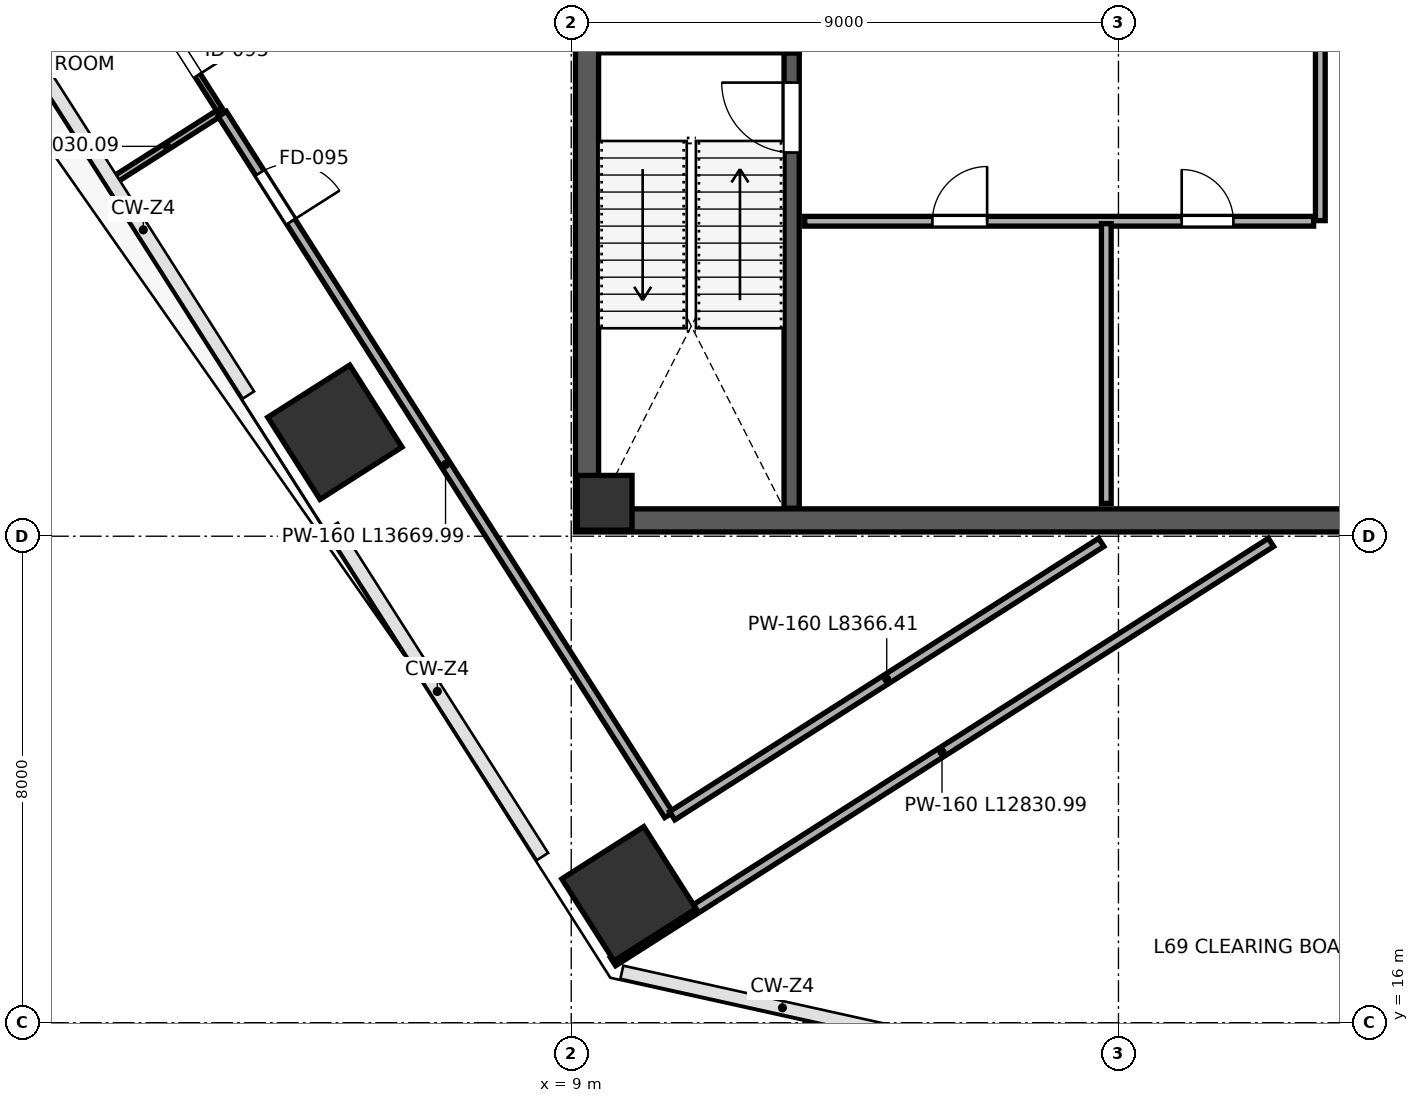
"""IFC4 building model, lengths in metres.
Left out: names, types, materials, properties, quantities, classifications, styles, units other than length and angle.
Written with IfcOpenShell. Run it as: python <this file> out.ifc"""

import sys

from ifc_helpers import new_model, si_unit, direction, frame, frame_2d, origin, origin_2d, place, context, subcontext, project, spatial, rectangle, extrude, source, transform, mapped, element, fill, save


model = new_model("IFC4")
c1 = context("Model", 3, precision=1e-05, world=origin(), true_north=direction((0.0, 1.0)))
c2 = subcontext(c1, "Body", "Model", "MODEL_VIEW")
j1 = project(units=[si_unit("LENGTHUNIT", "METRE"), si_unit("PLANEANGLEUNIT", "RADIAN")], contexts=[c1])
p1 = place(None, origin())
s1 = spatial("IfcSite", under=j1, at=p1, CompositionType="ELEMENT")
p2 = place(p1, origin())
s2 = spatial("IfcBuilding", under=s1, at=p2, CompositionType="ELEMENT")
p3 = place(p2, frame((0.0, 0.0, 307.2)))
s3 = spatial("IfcBuildingStorey", under=s2, at=p3, CompositionType="ELEMENT", Elevation=307.2)
m1 = source(origin(), c2, "Body", "SweptSolid", [
    extrude(rectangle(XDim=0.9, YDim=0.9, at=origin_2d()), origin(), (0.0, 0.0, 1.0), 4.198),
])
p4 = place(p3, frame((9.55, 24.55, 0.001), z_axis=(0.0, 0.0, 1.0), x_axis=(1.0, 0.0, 0.0)))
e1 = element("IfcColumn", 1, at=p4, inside=s3, PredefinedType="COLUMN", context=c2, shape_type="MappedRepresentation", body=[
    mapped(m1, transform((0.0, 0.0, 0.0), scale=1.0)),
])
m2 = source(origin(), c2, "Body", "SweptSolid", [
    extrude(rectangle(XDim=1.6, YDim=1.6, at=origin_2d()), origin(), (0.0, 0.0, 1.0), 4.198),
])
for number, where, z_axis, x_axis in (
    (2, (5.113, 25.71, 0.001), (0.0, 0.0, 1.0), (-0.537, 0.843, 0.0)),
    (3, (9.949, 18.12, 0.001), (0.0, 0.0, 1.0), (-0.537, 0.843, 0.0)),
    (4, (22.544, 15.472, 0.001), (0.0, 0.0, 1.0), (-0.537, 0.843, 0.0)),
):
    element("IfcColumn", number, at=place(p3, frame(where, z_axis=z_axis, x_axis=x_axis)), inside=s3, PredefinedType="COLUMN", context=c2, shape_type="MappedRepresentation", body=[
        mapped(m2, transform((0.0, 0.0, 0.0), scale=1.0)),
    ])
p5 = place(p3, frame((9.26, 24.45, 0.0), z_axis=(0.0, 0.0, 1.0), x_axis=(0.0, 1.0, 0.0)))
e5 = element("IfcWall", 5, at=p5, inside=s3, PredefinedType="SHEAR", context=c2, shape_type="SweptSolid", body=[
    extrude(rectangle(XDim=15.1, YDim=0.38, at=frame_2d((7.55, 0.0))), origin(), (0.0, 0.0, 1.0), 3.96),
])
p6 = place(p5, frame((8.7, 0.0, 0.0)))
e6 = element("IfcOpeningElement", 6, at=p6, cuts=e5, PredefinedType="OPENING", context=c2, shape_type="SweptSolid", body=[
    extrude(rectangle(XDim=1.15, YDim=2.2, at=frame_2d((0.575, 1.1))), frame((0.0, 0.2, 0.0), z_axis=(0.0, -1.0, 0.0), x_axis=(1.0, 0.0, 0.0)), (0.0, 0.0, 1.0), 0.4),
])
p7 = place(p3, frame((9.07, 24.26, 0.0), z_axis=(0.0, 0.0, 1.0), x_axis=(1.0, 0.0, 0.0)))
e7 = element("IfcWall", 7, at=p7, inside=s3, PredefinedType="SHEAR", context=c2, shape_type="SweptSolid", body=[
    extrude(rectangle(XDim=17.86, YDim=0.38, at=frame_2d((8.93, 0.0))), origin(), (0.0, 0.0, 1.0), 3.96),
])
p8 = place(p3, frame((12.625, 24.46, 0.0), z_axis=(0.0, 0.0, 1.0), x_axis=(0.0, 1.0, 0.0)))
e8 = element("IfcWall", 8, at=p8, inside=s3, PredefinedType="SHEAR", context=c2, shape_type="SweptSolid", body=[
    extrude(rectangle(XDim=7.49, YDim=0.25, at=frame_2d((3.745, 0.0))), origin(), (0.0, 0.0, 1.0), 3.96),
])
p9 = place(p8, frame((5.85, 0.0, 0.0)))
e9 = element("IfcOpeningElement", 9, at=p9, cuts=e8, PredefinedType="OPENING", context=c2, shape_type="SweptSolid", body=[
    extrude(rectangle(XDim=1.15, YDim=2.2, at=frame_2d((0.575, 1.1))), frame((0.0, 0.135, 0.0), z_axis=(0.0, -1.0, 0.0), x_axis=(1.0, 0.0, 0.0)), (0.0, 0.0, 1.0), 0.27),
])
p10 = place(p3, frame((9.46, 32.075, 0.0), z_axis=(0.0, 0.0, 1.0), x_axis=(1.0, 0.0, 0.0)))
e10 = element("IfcWall", 10, at=p10, inside=s3, PredefinedType="SHEAR", context=c2, shape_type="SweptSolid", body=[
    extrude(rectangle(XDim=3.29, YDim=0.25, at=frame_2d((1.645, 0.0))), origin(), (0.0, 0.0, 1.0), 3.96),
])
p11 = place(p3, frame((12.84, 29.18, 0.0), z_axis=(0.0, 0.0, 1.0), x_axis=(1.0, 0.0, 0.0)))
e11 = element("IfcWall", 11, at=p11, inside=s3, PredefinedType="PARTITIONING", context=c2, shape_type="SweptSolid", body=[
    extrude(rectangle(XDim=8.37, YDim=0.16, at=frame_2d((4.185, 0.0))), origin(), (0.0, 0.0, 1.0), 3.96),
])
p12 = place(p11, frame((2.1, 0.0, 0.0)))
e12 = element("IfcOpeningElement", 12, at=p12, cuts=e11, PredefinedType="OPENING", context=c2, shape_type="SweptSolid", body=[
    extrude(rectangle(XDim=0.9, YDim=2.15, at=frame_2d((0.45, 1.075))), frame((0.0, 0.09, 0.0), z_axis=(0.0, -1.0, 0.0), x_axis=(1.0, 0.0, 0.0)), (0.0, 0.0, 1.0), 0.18),
])
p13 = place(p11, frame((6.2, 0.0, 0.0)))
e13 = element("IfcOpeningElement", 13, at=p13, cuts=e11, PredefinedType="OPENING", context=c2, shape_type="SweptSolid", body=[
    extrude(rectangle(XDim=0.85, YDim=2.1, at=frame_2d((0.425, 1.05))), frame((0.0, 0.09, 0.0), z_axis=(0.0, -1.0, 0.0), x_axis=(1.0, 0.0, 0.0)), (0.0, 0.0, 1.0), 0.18),
])
p14 = place(p3, frame((17.8, 24.54, 0.0), z_axis=(0.0, 0.0, 1.0), x_axis=(0.0, 1.0, 0.0)))
e14 = element("IfcWall", 14, at=p14, inside=s3, PredefinedType="PARTITIONING", context=c2, shape_type="SweptSolid", body=[
    extrude(rectangle(XDim=4.6, YDim=0.16, at=frame_2d((2.3, 0.0))), origin(), (0.0, 0.0, 1.0), 3.96),
])
p15 = place(p3, frame((21.32, 29.19, 0.0), z_axis=(0.0, 0.0, 1.0), x_axis=(0.0, 1.0, 0.0)))
e15 = element("IfcWall", 15, at=p15, inside=s3, PredefinedType="PARTITIONING", context=c2, shape_type="SweptSolid", body=[
    extrude(rectangle(XDim=2.92, YDim=0.16, at=frame_2d((1.46, 0.0))), origin(), (0.0, 0.0, 1.0), 3.96),
])
p16 = place(p3, frame((1.493, 29.866, 0.0), z_axis=(0.0, 0.0, 1.0), x_axis=(0.843433611632, 0.537233415537, 0.0)))
e16 = element("IfcWall", 16, at=p16, inside=s3, PredefinedType="PARTITIONING", context=c2, shape_type="SweptSolid", body=[
    extrude(rectangle(XDim=2.03, YDim=0.115, at=frame_2d((1.015, 0.0))), origin(), (0.0, 0.0, 1.0), 3.295),
])
p17 = place(p3, frame((-0.502, 36.85, 0.0), z_axis=(0.0, 0.0, 1.0), x_axis=(0.537309039539, -0.843385437407, 0.0)))
e17 = element("IfcWall", 17, at=p17, inside=s3, PredefinedType="PARTITIONING", context=c2, shape_type="SweptSolid", body=[
    extrude(rectangle(XDim=6.922, YDim=0.1, at=frame_2d((3.461, 0.0))), origin(), (0.0, 0.0, 1.0), 3.96),
])
p18 = place(p17, frame((0.8, 0.0, 0.0)))
e18 = element("IfcOpeningElement", 18, at=p18, cuts=e17, PredefinedType="OPENING", context=c2, shape_type="SweptSolid", body=[
    extrude(rectangle(XDim=0.9, YDim=2.15, at=frame_2d((0.45, 1.075))), frame((0.0, 0.06, 0.0), z_axis=(0.0, -1.0, 0.0), x_axis=(1.0, 0.0, 0.0)), (0.0, 0.0, 1.0), 0.12),
])
p19 = place(p17, frame((5.3, 0.0, 0.0)))
e19 = element("IfcOpeningElement", 19, at=p19, cuts=e17, PredefinedType="OPENING", context=c2, shape_type="SweptSolid", body=[
    extrude(rectangle(XDim=0.95, YDim=2.15, at=frame_2d((0.475, 1.075))), frame((0.0, 0.06, 0.0), z_axis=(0.0, -1.0, 0.0), x_axis=(1.0, 0.0, 0.0)), (0.0, 0.0, 1.0), 0.12),
])
p20 = place(p3, frame((3.26, 30.945, 0.0), z_axis=(0.0, 0.0, 1.0), x_axis=(0.537307625317, -0.843386338386, 0.0)))
e20 = element("IfcWall", 20, at=p20, inside=s3, PredefinedType="PARTITIONING", context=c2, shape_type="SweptSolid", body=[
    extrude(rectangle(XDim=13.67, YDim=0.16, at=frame_2d((6.835, 0.0))), origin(), (0.0, 0.0, 1.0), 3.96),
])
p21 = place(p20, frame((1.15, 0.0, 0.0)))
e21 = element("IfcOpeningElement", 21, at=p21, cuts=e20, PredefinedType="OPENING", context=c2, shape_type="SweptSolid", body=[
    extrude(rectangle(XDim=0.95, YDim=2.15, at=frame_2d((0.475, 1.075))), frame((0.0, 0.09, 0.0), z_axis=(0.0, -1.0, 0.0), x_axis=(1.0, 0.0, 0.0)), (0.0, 0.0, 1.0), 0.18),
])
p22 = place(p3, frame((10.661, 19.403, 0.0), z_axis=(0.0, 0.0, 1.0), x_axis=(0.843399441764, 0.537287057012, 0.0)))
e22 = element("IfcWall", 22, at=p22, inside=s3, PredefinedType="PARTITIONING", context=c2, shape_type="SweptSolid", body=[
    extrude(rectangle(XDim=8.366, YDim=0.16, at=frame_2d((4.183, 0.0))), origin(), (0.0, 0.0, 1.0), 3.96),
])
p23 = place(p3, frame((9.687, 17.004, 0.0), z_axis=(0.0, 0.0, 1.0), x_axis=(0.843392646996, 0.537297722862, 0.0)))
e23 = element("IfcWall", 23, at=p23, inside=s3, PredefinedType="PARTITIONING", context=c2, shape_type="SweptSolid", body=[
    extrude(rectangle(XDim=12.831, YDim=0.16, at=frame_2d((6.416, 0.0))), origin(), (0.0, 0.0, 1.0), 3.96),
])
m3 = source(origin(), c2, "Body", "SweptSolid", [
    extrude(rectangle(XDim=1.15, YDim=2.2, at=frame_2d((0.575, 1.1))), frame((0.0, 0.025, 0.0), z_axis=(0.0, -1.0, 0.0), x_axis=(1.0, 0.0, 0.0)), (0.0, 0.0, 1.0), 0.05),
])
p24 = place(p9, origin())
e24 = element("IfcDoor", 24, at=p24, inside=s3, OperationType="SINGLE_SWING_RIGHT", PredefinedType="DOOR", context=c2, shape_type="MappedRepresentation", body=[
    mapped(m3, transform((0.0, 0.0, 0.0), scale=1.0)),
])
fill(e9, e24)
m4 = source(origin(), c2, "Body", "SweptSolid", [
    extrude(rectangle(XDim=0.9, YDim=2.15, at=frame_2d((0.45, 1.075))), frame((0.0, 0.025, 0.0), z_axis=(0.0, -1.0, 0.0), x_axis=(1.0, 0.0, 0.0)), (0.0, 0.0, 1.0), 0.05),
])
p25 = place(p12, origin())
e25 = element("IfcDoor", 25, at=p25, inside=s3, OperationType="SINGLE_SWING_RIGHT", PredefinedType="DOOR", context=c2, shape_type="MappedRepresentation", body=[
    mapped(m4, transform((0.0, 0.0, 0.0), scale=1.0)),
])
fill(e12, e25)
m5 = source(origin(), c2, "Body", "SweptSolid", [
    extrude(rectangle(XDim=0.85, YDim=2.1, at=frame_2d((0.425, 1.05))), frame((0.0, 0.025, 0.0), z_axis=(0.0, -1.0, 0.0), x_axis=(1.0, 0.0, 0.0)), (0.0, 0.0, 1.0), 0.05),
])
p26 = place(p13, origin())
e26 = element("IfcDoor", 26, at=p26, inside=s3, OperationType="SINGLE_SWING_LEFT", PredefinedType="DOOR", context=c2, shape_type="MappedRepresentation", body=[
    mapped(m5, transform((0.0, 0.0, 0.0), scale=1.0)),
])
fill(e13, e26)
m6 = source(origin(), c2, "Body", "SweptSolid", [
    extrude(rectangle(XDim=0.95, YDim=2.15, at=frame_2d((0.475, 1.075))), frame((0.0, 0.025, 0.0), z_axis=(0.0, -1.0, 0.0), x_axis=(1.0, 0.0, 0.0)), (0.0, 0.0, 1.0), 0.05),
])
p27 = place(p19, origin())
e27 = element("IfcDoor", 27, at=p27, inside=s3, OperationType="SINGLE_SWING_RIGHT", PredefinedType="DOOR", context=c2, shape_type="MappedRepresentation", body=[
    mapped(m6, transform((0.0, 0.0, 0.0), scale=1.0)),
])
fill(e19, e27)
m7 = source(origin(), c2, "Body", "SweptSolid", [
    extrude(rectangle(XDim=0.95, YDim=2.15, at=frame_2d((0.475, 1.075))), frame((0.0, 0.025, 0.0), z_axis=(0.0, -1.0, 0.0), x_axis=(1.0, 0.0, 0.0)), (0.0, 0.0, 1.0), 0.05),
])
p28 = place(p21, origin())
e28 = element("IfcDoor", 28, at=p28, inside=s3, OperationType="SINGLE_SWING_RIGHT", PredefinedType="DOOR", context=c2, shape_type="MappedRepresentation", body=[
    mapped(m7, transform((0.0, 0.0, 0.0), scale=1.0)),
])
fill(e21, e28)
save(model, sys.argv[1])
